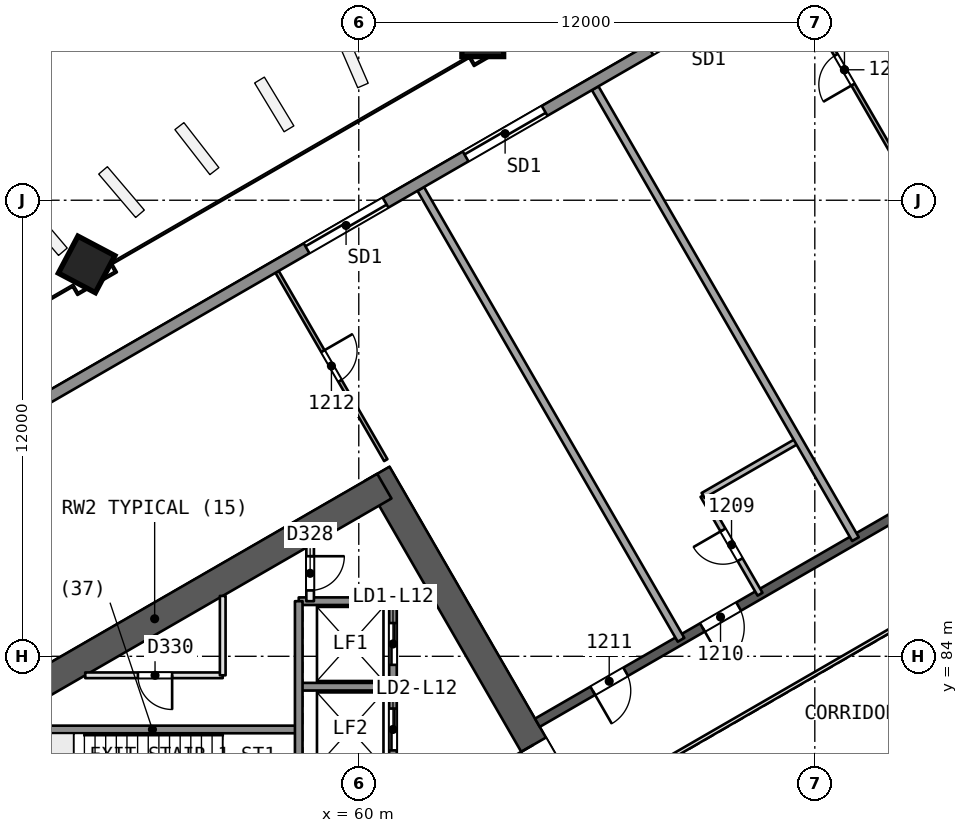
"""IFC4 building model, lengths in metres.
Left out: names, types, materials, properties, quantities, classifications, styles, units other than length and angle.
Written with IfcOpenShell. Run it as: python <this file> out.ifc"""

import sys

from ifc_helpers import new_model, si_unit, direction, frame, frame_2d, origin, origin_2d, place, context, subcontext, project, spatial, rectangle, extrude, element, fill, save


model = new_model("IFC4")
c1 = context("Model", 3, precision=1e-05, world=origin(), true_north=direction((0.0, 1.0)))
c2 = subcontext(c1, "Body", "Model", "MODEL_VIEW")
j1 = project(units=[si_unit("LENGTHUNIT", "METRE"), si_unit("PLANEANGLEUNIT", "RADIAN")], contexts=[c1])
p1 = place(None, origin())
s1 = spatial("IfcSite", under=j1, at=p1, CompositionType="ELEMENT")
p2 = place(p1, origin())
s2 = spatial("IfcBuilding", under=s1, at=p2, CompositionType="ELEMENT")
p3 = place(p2, frame((0.0, 0.0, 57.3)))
s3 = spatial("IfcBuildingStorey", under=s2, at=p3, CompositionType="ELEMENT", Elevation=57.3)
p4 = place(p3, frame((65.567, 80.0, 0.0), z_axis=(0.0, 0.0, 1.0), x_axis=(-0.499988615364, 0.866031976607, 0.0)))
e1 = element("IfcWall", 1, at=p4, inside=s3, PredefinedType="SHEAR", context=c2, shape_type="SweptSolid", body=[
    extrude(rectangle(XDim=10.163, YDim=0.75, at=frame_2d((5.082, 0.0))), origin(), (0.0, 0.0, 1.0), 3.7),
])
p5 = place(p4, frame((0.733, 0.0, 0.0)))
e2 = element("IfcOpeningElement", 2, at=p5, cuts=e1, PredefinedType="OPENING", context=c2, shape_type="SweptSolid", body=[
    extrude(rectangle(XDim=1.2, YDim=2.1, at=frame_2d((0.6, 1.05))), frame((0.0, 0.385, 0.0), z_axis=(0.0, -1.0, 0.0), x_axis=(1.0, 0.0, 0.0)), (0.0, 0.0, 1.0), 0.771),
])
p6 = place(p3, frame((60.673, 88.477, 0.0), z_axis=(0.0, 0.0, 1.0), x_axis=(-0.8660248072, -0.500001033313, 0.0)))
e3 = element("IfcWall", 3, at=p6, inside=s3, PredefinedType="SHEAR", context=c2, shape_type="SweptSolid", body=[
    extrude(rectangle(XDim=13.958, YDim=0.75, at=frame_2d((6.979, 0.0))), origin(), (0.0, 0.0, 1.0), 3.7),
])
p7 = place(p3, frame((78.2, 90.046, 0.0), z_axis=(0.0, 0.0, 1.0), x_axis=(-0.866026492143, -0.499998114903, 0.0)))
e4 = element("IfcWall", 4, at=p7, inside=s3, PredefinedType="SHEAR", context=c2, shape_type="SweptSolid", body=[
    extrude(rectangle(XDim=15.588, YDim=0.25, at=frame_2d((7.794, 0.0))), origin(), (0.0, 0.0, 1.0), 3.2),
])
p8 = place(p7, frame((2.462, 0.0, 0.0)))
e5 = element("IfcOpeningElement", 5, at=p8, cuts=e4, PredefinedType="OPENING", context=c2, shape_type="SweptSolid", body=[
    extrude(rectangle(XDim=1.0, YDim=2.1, at=frame_2d((0.5, 1.05))), frame((0.0, 0.135, 0.0), z_axis=(0.0, -1.0, 0.0), x_axis=(1.0, 0.0, 0.0)), (0.0, 0.0, 1.0), 0.271),
])
p9 = place(p7, frame((9.474, 0.0, 0.0)))
e6 = element("IfcOpeningElement", 6, at=p9, cuts=e4, PredefinedType="OPENING", context=c2, shape_type="SweptSolid", body=[
    extrude(rectangle(XDim=1.1, YDim=2.1, at=frame_2d((0.55, 1.05))), frame((0.0, 0.135, 0.0), z_axis=(0.0, -1.0, 0.0), x_axis=(1.0, 0.0, 0.0)), (0.0, 0.0, 1.0), 0.271),
])
p10 = place(p7, frame((12.906, 0.0, 0.0)))
e7 = element("IfcOpeningElement", 7, at=p10, cuts=e4, PredefinedType="OPENING", context=c2, shape_type="SweptSolid", body=[
    extrude(rectangle(XDim=1.0, YDim=2.1, at=frame_2d((0.5, 1.05))), frame((0.0, 0.135, 0.0), z_axis=(0.0, -1.0, 0.0), x_axis=(1.0, 0.0, 0.0)), (0.0, 0.0, 1.0), 0.271),
])
p11 = place(p3, frame((63.25, 100.351, 0.0), z_axis=(0.010093620709, -0.017482414954, 0.999796221231), x_axis=(-0.499897086036, 0.865849517735, 0.020187025824)))
e8 = element("IfcColumn", 8, at=p11, inside=s3, PredefinedType="COLUMN", context=c2, shape_type="SweptSolid", body=[
    extrude(rectangle(XDim=1.1, YDim=1.1, at=origin_2d()), origin(), (0.0, 0.0, 1.0), 3.701),
])
p12 = place(p3, frame((52.816, 94.326, 0.0), z_axis=(0.019328516974, -0.012138044789, 0.999739504221), x_axis=(-0.500205614953, 0.865671455024, 0.020181048691)))
e9 = element("IfcColumn", 9, at=p12, inside=s3, PredefinedType="COLUMN", context=c2, shape_type="SweptSolid", body=[
    extrude(rectangle(XDim=1.1, YDim=1.1, at=origin_2d()), origin(), (0.0, 0.0, 1.0), 3.701),
])
p13 = place(p3, frame((74.21, 96.956, 0.0), z_axis=(0.0, 0.0, 1.0), x_axis=(-0.499976111731, 0.866039195244, 0.0)))
e10 = element("IfcWall", 10, at=p13, inside=s3, PredefinedType="PARTITIONING", context=c2, shape_type="SweptSolid", body=[
    extrude(rectangle(XDim=5.721, YDim=0.1, at=frame_2d((2.86, 0.0))), origin(), (0.0, 0.0, 1.0), 3.2),
])
p14 = place(p13, frame((2.41, 0.0, 0.0)))
e11 = element("IfcOpeningElement", 11, at=p14, cuts=e10, PredefinedType="OPENING", context=c2, shape_type="SweptSolid", body=[
    extrude(rectangle(XDim=0.9, YDim=2.1, at=frame_2d((0.45, 1.05))), frame((0.0, 0.061, 0.0), z_axis=(0.0, -1.0, 0.0), x_axis=(1.0, 0.0, 0.0)), (0.0, 0.0, 1.0), 0.121),
])
p15 = place(p3, frame((66.22, 98.948, 0.0), z_axis=(0.0, 0.0, 1.0), x_axis=(0.500006802525, -0.866021476309, 0.0)))
e12 = element("IfcWall", 12, at=p15, inside=s3, PredefinedType="PARTITIONING", context=c2, shape_type="SweptSolid", body=[
    extrude(rectangle(XDim=13.7, YDim=0.2, at=frame_2d((6.85, 0.0))), origin(), (0.0, 0.0, 1.0), 3.2),
])
p16 = place(p3, frame((70.559, 85.634, 0.0), z_axis=(0.0, 0.0, 1.0), x_axis=(-0.499990139034, 0.866031096941, 0.0)))
e13 = element("IfcWall", 13, at=p16, inside=s3, PredefinedType="PARTITIONING", context=c2, shape_type="SweptSolid", body=[
    extrude(rectangle(XDim=3.0, YDim=0.15, at=frame_2d((1.5, 0.0))), origin(), (0.0, 0.0, 1.0), 3.2),
])
p17 = place(p16, frame((1.05, 0.0, 0.0)))
e14 = element("IfcOpeningElement", 14, at=p17, cuts=e13, PredefinedType="OPENING", context=c2, shape_type="SweptSolid", body=[
    extrude(rectangle(XDim=0.9, YDim=2.1, at=frame_2d((0.45, 1.05))), frame((0.0, 0.085, 0.0), z_axis=(0.0, -1.0, 0.0), x_axis=(1.0, 0.0, 0.0)), (0.0, 0.0, 1.0), 0.171),
])
p18 = place(p3, frame((69.059, 88.232, 0.0), z_axis=(0.0, 0.0, 1.0), x_axis=(0.866032775405, 0.499987231761, 0.0)))
e15 = element("IfcWall", 15, at=p18, inside=s3, PredefinedType="PARTITIONING", context=c2, shape_type="SweptSolid", body=[
    extrude(rectangle(XDim=2.9, YDim=0.15, at=frame_2d((1.45, 0.0))), origin(), (0.0, 0.0, 1.0), 3.2),
])
p19 = place(p3, frame((61.63, 96.298, 0.0), z_axis=(0.0, 0.0, 1.0), x_axis=(0.500001153704, -0.866024737692, 0.0)))
e16 = element("IfcWall", 16, at=p19, inside=s3, PredefinedType="PARTITIONING", context=c2, shape_type="SweptSolid", body=[
    extrude(rectangle(XDim=13.7, YDim=0.2, at=frame_2d((6.85, 0.0))), origin(), (0.0, 0.0, 1.0), 3.2),
])
p20 = place(p3, frame((57.85, 94.116, 0.0), z_axis=(0.0, 0.0, 1.0), x_axis=(0.499994590374, -0.866028527011, 0.0)))
e17 = element("IfcWall", 17, at=p20, inside=s3, PredefinedType="PARTITIONING", context=c2, shape_type="SweptSolid", body=[
    extrude(rectangle(XDim=5.721, YDim=0.1, at=frame_2d((2.86, 0.0))), origin(), (0.0, 0.0, 1.0), 3.2),
])
p21 = place(p20, frame((2.41, 0.0, 0.0)))
e18 = element("IfcOpeningElement", 18, at=p21, cuts=e17, PredefinedType="OPENING", context=c2, shape_type="SweptSolid", body=[
    extrude(rectangle(XDim=0.9, YDim=2.1, at=frame_2d((0.45, 1.05))), frame((0.0, 0.061, 0.0), z_axis=(0.0, -1.0, 0.0), x_axis=(1.0, 0.0, 0.0)), (0.0, 0.0, 1.0), 0.121),
])
p22 = place(p3, frame((38.441, 83.082, 0.0), z_axis=(0.0, 0.0, 1.0), x_axis=(0.866026578911, 0.499997964616, 0.0)))
e19 = element("IfcWall", 19, at=p22, inside=s3, PredefinedType="SOLIDWALL", context=c2, shape_type="SweptSolid", body=[
    extrude(rectangle(XDim=60.24, YDim=0.3, at=frame_2d((30.12, 0.0))), origin(), (0.0, 0.0, 1.0), 3.2),
])
p23 = place(p22, frame((28.141, 0.0, 0.0)))
e20 = element("IfcOpeningElement", 20, at=p23, cuts=e19, PredefinedType="OPENING", context=c2, shape_type="SweptSolid", body=[
    extrude(rectangle(XDim=2.4, YDim=2.4, at=frame_2d((1.2, 1.2))), frame((0.0, 0.161, 0.0), z_axis=(0.0, -1.0, 0.0), x_axis=(1.0, 0.0, 0.0)), (0.0, 0.0, 1.0), 0.321),
])
p24 = place(p22, frame((33.752, 0.0, 0.0)))
e21 = element("IfcOpeningElement", 21, at=p24, cuts=e19, PredefinedType="OPENING", context=c2, shape_type="SweptSolid", body=[
    extrude(rectangle(XDim=2.4, YDim=2.4, at=frame_2d((1.2, 1.2))), frame((0.0, 0.161, 0.0), z_axis=(0.0, -1.0, 0.0), x_axis=(1.0, 0.0, 0.0)), (0.0, 0.0, 1.0), 0.321),
])
p25 = place(p22, frame((46.722, 0.0, 0.0)))
e22 = element("IfcOpeningElement", 22, at=p25, cuts=e19, PredefinedType="OPENING", context=c2, shape_type="SweptSolid", body=[
    extrude(rectangle(XDim=2.4, YDim=2.4, at=frame_2d((1.2, 1.2))), frame((0.0, 0.161, 0.0), z_axis=(0.0, -1.0, 0.0), x_axis=(1.0, 0.0, 0.0)), (0.0, 0.0, 1.0), 0.321),
])
p26 = place(p22, frame((23.308, 0.0, 0.0)))
e23 = element("IfcOpeningElement", 23, at=p26, cuts=e19, PredefinedType="OPENING", context=c2, shape_type="SweptSolid", body=[
    extrude(rectangle(XDim=2.4, YDim=2.4, at=frame_2d((1.2, 1.2))), frame((0.0, 0.161, 0.0), z_axis=(0.0, -1.0, 0.0), x_axis=(1.0, 0.0, 0.0)), (0.0, 0.0, 1.0), 0.321),
])
p27 = place(p22, frame((11.117, 0.0, 0.0)))
e24 = element("IfcOpeningElement", 24, at=p27, cuts=e19, PredefinedType="OPENING", context=c2, shape_type="SweptSolid", body=[
    extrude(rectangle(XDim=2.4, YDim=2.4, at=frame_2d((1.2, 1.2))), frame((0.0, 0.161, 0.0), z_axis=(0.0, -1.0, 0.0), x_axis=(1.0, 0.0, 0.0)), (0.0, 0.0, 1.0), 0.321),
])
p28 = place(p3, frame((60.9, 85.45, 0.0), z_axis=(0.0, 0.0, 1.0), x_axis=(-1.0, 0.0, 0.0)))
e25 = element("IfcWall", 25, at=p28, inside=s3, PredefinedType="SOLIDWALL", context=c2, shape_type="SweptSolid", body=[
    extrude(rectangle(XDim=2.48, YDim=0.2, at=frame_2d((1.24, 0.0))), origin(), (0.0, 0.0, 1.0), 3.2),
])
p29 = place(p3, frame((56.42, 83.5, 0.0), z_axis=(0.0, 0.0, 1.0), x_axis=(-1.0, 0.0, 0.0)))
e26 = element("IfcWall", 26, at=p29, inside=s3, PredefinedType="PARTITIONING", context=c2, shape_type="SweptSolid", body=[
    extrude(rectangle(XDim=3.618, YDim=0.15, at=frame_2d((1.809, 0.0))), origin(), (0.0, 0.0, 1.0), 3.2),
])
p30 = place(p29, frame((1.332, 0.0, 0.0)))
e27 = element("IfcOpeningElement", 27, at=p30, cuts=e26, PredefinedType="OPENING", context=c2, shape_type="SweptSolid", body=[
    extrude(rectangle(XDim=0.9, YDim=2.1, at=frame_2d((0.45, 1.05))), frame((0.0, 0.085, 0.0), z_axis=(0.0, -1.0, 0.0), x_axis=(1.0, 0.0, 0.0)), (0.0, 0.0, 1.0), 0.171),
])
p31 = place(p3, frame((60.9, 83.2, 0.0), z_axis=(0.0, 0.0, 1.0), x_axis=(-1.0, 0.0, 0.0)))
e28 = element("IfcWall", 28, at=p31, inside=s3, PredefinedType="SOLIDWALL", context=c2, shape_type="SweptSolid", body=[
    extrude(rectangle(XDim=2.48, YDim=0.2, at=frame_2d((1.24, 0.0))), origin(), (0.0, 0.0, 1.0), 3.2),
])
p32 = place(p3, frame((58.42, 82.075, 0.0), z_axis=(0.0, 0.0, 1.0), x_axis=(-1.0, 0.0, 0.0)))
e29 = element("IfcWall", 29, at=p32, inside=s3, PredefinedType="SOLIDWALL", context=c2, shape_type="SweptSolid", body=[
    extrude(rectangle(XDim=7.7, YDim=0.2, at=frame_2d((3.85, 0.0))), origin(), (0.0, 0.0, 1.0), 3.2),
])
p33 = place(p3, frame((60.9, 85.45, 0.0), z_axis=(0.0, 0.0, 1.0), x_axis=(0.0, -1.0, 0.0)))
e30 = element("IfcWall", 30, at=p33, inside=s3, PredefinedType="SOLIDWALL", context=c2, shape_type="SweptSolid", body=[
    extrude(rectangle(XDim=10.9, YDim=0.2, at=frame_2d((5.45, 0.0))), origin(), (0.0, 0.0, 1.0), 3.2),
])
p34 = place(p33, frame((0.575, 0.0, 0.0)))
e31 = element("IfcOpeningElement", 31, at=p34, cuts=e30, PredefinedType="OPENING", context=c2, shape_type="SweptSolid", body=[
    extrude(rectangle(XDim=1.1, YDim=2.1, at=frame_2d((0.55, 1.05))), frame((0.0, 0.11, 0.0), z_axis=(0.0, -1.0, 0.0), x_axis=(1.0, 0.0, 0.0)), (0.0, 0.0, 1.0), 0.221),
])
p35 = place(p33, frame((2.825, 0.0, 0.0)))
e32 = element("IfcOpeningElement", 32, at=p35, cuts=e30, PredefinedType="OPENING", context=c2, shape_type="SweptSolid", body=[
    extrude(rectangle(XDim=1.1, YDim=2.1, at=frame_2d((0.55, 1.05))), frame((0.0, 0.11, 0.0), z_axis=(0.0, -1.0, 0.0), x_axis=(1.0, 0.0, 0.0)), (0.0, 0.0, 1.0), 0.221),
])
p36 = place(p33, frame((5.075, 0.0, 0.0)))
e33 = element("IfcOpeningElement", 33, at=p36, cuts=e30, PredefinedType="OPENING", context=c2, shape_type="SweptSolid", body=[
    extrude(rectangle(XDim=1.1, YDim=2.1, at=frame_2d((0.55, 1.05))), frame((0.0, 0.11, 0.0), z_axis=(0.0, -1.0, 0.0), x_axis=(1.0, 0.0, 0.0)), (0.0, 0.0, 1.0), 0.221),
])
p37 = place(p33, frame((7.325, 0.0, 0.0)))
e34 = element("IfcOpeningElement", 34, at=p37, cuts=e30, PredefinedType="OPENING", context=c2, shape_type="SweptSolid", body=[
    extrude(rectangle(XDim=1.1, YDim=2.1, at=frame_2d((0.55, 1.05))), frame((0.0, 0.11, 0.0), z_axis=(0.0, -1.0, 0.0), x_axis=(1.0, 0.0, 0.0)), (0.0, 0.0, 1.0), 0.221),
])
p38 = place(p3, frame((58.72, 86.917, 0.0), z_axis=(0.0, 0.0, 1.0), x_axis=(0.0, -1.0, 0.0)))
e35 = element("IfcWall", 35, at=p38, inside=s3, PredefinedType="PARTITIONING", context=c2, shape_type="SweptSolid", body=[
    extrude(rectangle(XDim=1.467, YDim=0.2, at=frame_2d((0.733, 0.0))), origin(), (0.0, 0.0, 1.0), 3.2),
])
p39 = place(p38, frame((0.283, 0.0, 0.0)))
e36 = element("IfcOpeningElement", 36, at=p39, cuts=e35, PredefinedType="OPENING", context=c2, shape_type="SweptSolid", body=[
    extrude(rectangle(XDim=0.9, YDim=2.1, at=frame_2d((0.45, 1.05))), frame((0.0, 0.11, 0.0), z_axis=(0.0, -1.0, 0.0), x_axis=(1.0, 0.0, 0.0)), (0.0, 0.0, 1.0), 0.221),
])
p40 = place(p3, frame((58.42, 85.45, 0.0), z_axis=(0.0, 0.0, 1.0), x_axis=(0.0, -1.0, 0.0)))
e37 = element("IfcWall", 37, at=p40, inside=s3, PredefinedType="SOLIDWALL", context=c2, shape_type="SweptSolid", body=[
    extrude(rectangle(XDim=9.0, YDim=0.2, at=frame_2d((4.5, 0.0))), origin(), (0.0, 0.0, 1.0), 3.2),
])
p41 = place(p3, frame((56.42, 85.589, 0.0), z_axis=(0.0, 0.0, 1.0), x_axis=(0.0, -1.0, 0.0)))
e38 = element("IfcWall", 38, at=p41, inside=s3, PredefinedType="PARTITIONING", context=c2, shape_type="SweptSolid", body=[
    extrude(rectangle(XDim=2.089, YDim=0.15, at=frame_2d((1.044, 0.0))), origin(), (0.0, 0.0, 1.0), 3.2),
])
p42 = place(p3, frame((77.738, 86.846, 0.0), z_axis=(0.0, 0.0, 1.0), x_axis=(-0.866026658274, -0.499997827154, 0.0)))
e39 = element("IfcWall", 39, at=p42, inside=s3, PredefinedType="PARTITIONING", context=c2, shape_type="SweptSolid", body=[
    extrude(rectangle(XDim=11.588, YDim=0.1, at=frame_2d((5.794, 0.0))), origin(), (0.0, 0.0, 1.0), 3.2),
])
p43 = place(p14, origin())
e40 = element("IfcDoor", 40, at=p43, inside=s3, OperationType="SINGLE_SWING_LEFT", PredefinedType="NOTDEFINED", context=c2, shape_type="SweptSolid", body=[
    extrude(rectangle(XDim=0.9, YDim=2.1, at=frame_2d((0.45, 1.05))), frame((0.0, 0.025, 0.0), z_axis=(0.0, -1.0, 0.0), x_axis=(1.0, 0.0, 0.0)), (0.0, 0.0, 1.0), 0.05),
])
fill(e11, e40)
p44 = place(p17, origin())
e41 = element("IfcDoor", 41, at=p44, inside=s3, OperationType="SINGLE_SWING_RIGHT", PredefinedType="NOTDEFINED", context=c2, shape_type="SweptSolid", body=[
    extrude(rectangle(XDim=0.9, YDim=2.1, at=frame_2d((0.45, 1.05))), frame((0.0, 0.025, 0.0), z_axis=(0.0, -1.0, 0.0), x_axis=(1.0, 0.0, 0.0)), (0.0, 0.0, 1.0), 0.05),
])
fill(e14, e41)
p45 = place(p9, origin())
e42 = element("IfcDoor", 42, at=p45, inside=s3, OperationType="SINGLE_SWING_RIGHT", PredefinedType="NOTDEFINED", context=c2, shape_type="SweptSolid", body=[
    extrude(rectangle(XDim=1.1, YDim=2.1, at=frame_2d((0.55, 1.05))), frame((0.0, 0.025, 0.0), z_axis=(0.0, -1.0, 0.0), x_axis=(1.0, 0.0, 0.0)), (0.0, 0.0, 1.0), 0.05),
])
fill(e6, e42)
p46 = place(p10, origin())
e43 = element("IfcDoor", 43, at=p46, inside=s3, OperationType="SINGLE_SWING_RIGHT", PredefinedType="NOTDEFINED", context=c2, shape_type="SweptSolid", body=[
    extrude(rectangle(XDim=1.0, YDim=2.1, at=frame_2d((0.5, 1.05))), frame((0.0, 0.025, 0.0), z_axis=(0.0, -1.0, 0.0), x_axis=(1.0, 0.0, 0.0)), (0.0, 0.0, 1.0), 0.05),
])
fill(e7, e43)
p47 = place(p21, origin())
e44 = element("IfcDoor", 44, at=p47, inside=s3, OperationType="SINGLE_SWING_LEFT", PredefinedType="NOTDEFINED", context=c2, shape_type="SweptSolid", body=[
    extrude(rectangle(XDim=0.9, YDim=2.1, at=frame_2d((0.45, 1.05))), frame((0.0, 0.025, 0.0), z_axis=(0.0, -1.0, 0.0), x_axis=(1.0, 0.0, 0.0)), (0.0, 0.0, 1.0), 0.05),
])
fill(e18, e44)
p48 = place(p23, origin())
e45 = element("IfcDoor", 45, at=p48, inside=s3, OperationType="SLIDING_TO_LEFT", PredefinedType="NOTDEFINED", context=c2, shape_type="SweptSolid", body=[
    extrude(rectangle(XDim=2.4, YDim=2.4, at=frame_2d((1.2, 1.2))), frame((0.0, 0.025, 0.0), z_axis=(0.0, -1.0, 0.0), x_axis=(1.0, 0.0, 0.0)), (0.0, 0.0, 1.0), 0.05),
])
fill(e20, e45)
p49 = place(p26, origin())
e46 = element("IfcDoor", 46, at=p49, inside=s3, OperationType="SLIDING_TO_RIGHT", PredefinedType="NOTDEFINED", context=c2, shape_type="SweptSolid", body=[
    extrude(rectangle(XDim=2.4, YDim=2.4, at=frame_2d((1.2, 1.2))), frame((0.0, 0.025, 0.0), z_axis=(0.0, -1.0, 0.0), x_axis=(1.0, 0.0, 0.0)), (0.0, 0.0, 1.0), 0.05),
])
fill(e23, e46)
p50 = place(p5, origin())
e47 = element("IfcDoor", 47, at=p50, inside=s3, OperationType="SINGLE_SWING_RIGHT", PredefinedType="NOTDEFINED", context=c2, shape_type="SweptSolid", body=[
    extrude(rectangle(XDim=1.2, YDim=2.1, at=frame_2d((0.6, 1.05))), frame((0.0, 0.025, 0.0), z_axis=(0.0, -1.0, 0.0), x_axis=(1.0, 0.0, 0.0)), (0.0, 0.0, 1.0), 0.05),
])
fill(e2, e47)
p51 = place(p34, origin())
e48 = element("IfcDoor", 48, at=p51, inside=s3, OperationType="SLIDING_TO_RIGHT", PredefinedType="NOTDEFINED", context=c2, shape_type="SweptSolid", body=[
    extrude(rectangle(XDim=1.1, YDim=2.1, at=frame_2d((0.55, 1.05))), frame((0.0, 0.025, 0.0), z_axis=(0.0, -1.0, 0.0), x_axis=(1.0, 0.0, 0.0)), (0.0, 0.0, 1.0), 0.05),
])
fill(e31, e48)
p52 = place(p35, origin())
e49 = element("IfcDoor", 49, at=p52, inside=s3, OperationType="SLIDING_TO_LEFT", PredefinedType="NOTDEFINED", context=c2, shape_type="SweptSolid", body=[
    extrude(rectangle(XDim=1.1, YDim=2.1, at=frame_2d((0.55, 1.05))), frame((0.0, 0.025, 0.0), z_axis=(0.0, -1.0, 0.0), x_axis=(1.0, 0.0, 0.0)), (0.0, 0.0, 1.0), 0.05),
])
fill(e32, e49)
p53 = place(p39, origin())
e50 = element("IfcDoor", 50, at=p53, inside=s3, OperationType="SINGLE_SWING_LEFT", PredefinedType="NOTDEFINED", context=c2, shape_type="SweptSolid", body=[
    extrude(rectangle(XDim=0.9, YDim=2.1, at=frame_2d((0.45, 1.05))), frame((0.0, 0.025, 0.0), z_axis=(0.0, -1.0, 0.0), x_axis=(1.0, 0.0, 0.0)), (0.0, 0.0, 1.0), 0.05),
])
fill(e36, e50)
p54 = place(p30, origin())
e51 = element("IfcDoor", 51, at=p54, inside=s3, OperationType="SINGLE_SWING_LEFT", PredefinedType="NOTDEFINED", context=c2, shape_type="SweptSolid", body=[
    extrude(rectangle(XDim=0.9, YDim=2.1, at=frame_2d((0.45, 1.05))), frame((0.0, 0.025, 0.0), z_axis=(0.0, -1.0, 0.0), x_axis=(1.0, 0.0, 0.0)), (0.0, 0.0, 1.0), 0.05),
])
fill(e27, e51)
save(model, sys.argv[1])
